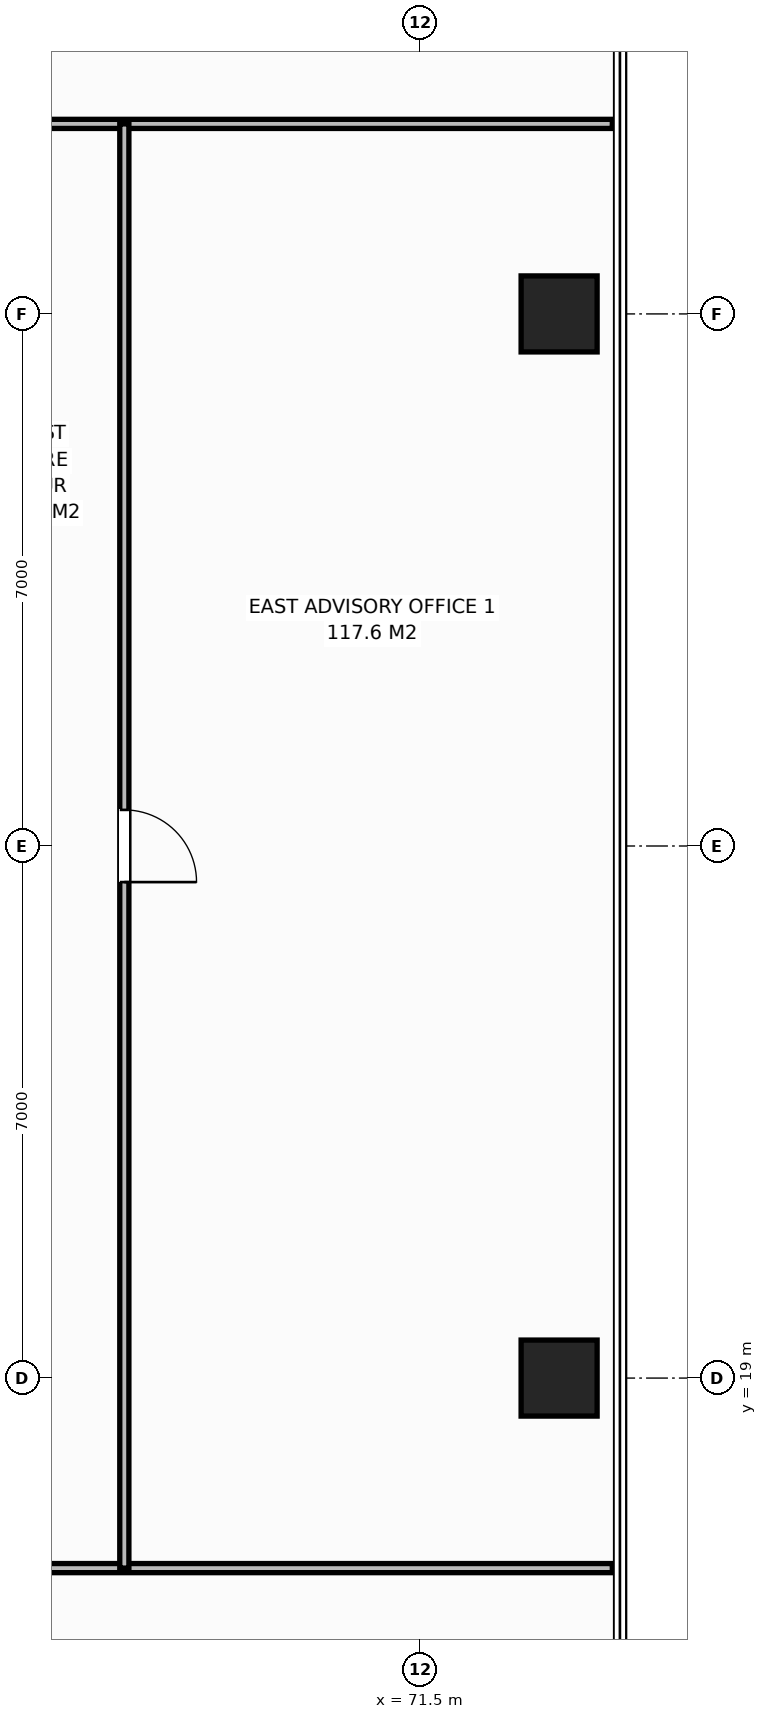
"""IFC4 building model, lengths in metres.
Left out: names, types, materials, properties, quantities, classifications, styles, units other than length and angle.
Written with IfcOpenShell. Run it as: python <this file> out.ifc"""

import sys

from ifc_helpers import new_model, si_unit, direction, frame, frame_2d, origin, origin_2d, place, context, subcontext, project, spatial, rectangle, extrude, element, fill, save


model = new_model("IFC4")
c1 = context("Model", 3, precision=1e-05, world=origin(), true_north=direction((0.0, 1.0)))
c2 = subcontext(c1, "Body", "Model", "MODEL_VIEW")
j1 = project(units=[si_unit("LENGTHUNIT", "METRE"), si_unit("PLANEANGLEUNIT", "RADIAN")], contexts=[c1])
p1 = place(None, origin())
s1 = spatial("IfcSite", under=j1, at=p1, CompositionType="ELEMENT")
p2 = place(p1, origin())
s2 = spatial("IfcBuilding", under=s1, at=p2, CompositionType="ELEMENT")
p3 = place(p2, frame((0.0, 0.0, 148.0)))
s3 = spatial("IfcBuildingStorey", under=s2, at=p3, CompositionType="ELEMENT", Elevation=148.0)
for number, where, z_axis, x_axis in (
    (1, (73.32, 19.0, 0.0), (0.0, 0.0, 1.0), (1.0, 0.0, 0.0)),
    (2, (73.32, 33.0, 0.0), (0.0, 0.0, 1.0), (1.0, 0.0, 0.0)),
):
    element("IfcColumn", number, at=place(p3, frame(where, z_axis=z_axis, x_axis=x_axis)), inside=s3, PredefinedType="COLUMN", context=c2, shape_type="SweptSolid", body=[
        extrude(rectangle(XDim=1.0, YDim=1.0, at=origin_2d()), origin(), (0.0, 0.0, 1.0), 3.8),
    ])
p4 = place(p3, frame((60.983, 35.5, 0.0), z_axis=(0.0, 0.0, 1.0), x_axis=(1.0, 0.0, 0.0)))
e3 = element("IfcWall", 3, at=p4, inside=s3, PredefinedType="PARTITIONING", context=c2, shape_type="SweptSolid", body=[
    extrude(rectangle(XDim=13.037, YDim=0.12, at=frame_2d((6.519, 0.0))), origin(), (0.0, 0.0, 1.0), 3.572),
])
p5 = place(p4, frame((0.48, 0.0, 0.0)))
e4 = element("IfcOpeningElement", 4, at=p5, cuts=e3, PredefinedType="OPENING", context=c2, shape_type="SweptSolid", body=[
    extrude(rectangle(XDim=0.95, YDim=2.15, at=frame_2d((0.475, 1.075))), frame((0.0, 0.07, 0.0), z_axis=(0.0, -1.0, 0.0), x_axis=(1.0, 0.0, 0.0)), (0.0, 0.0, 1.0), 0.14),
])
p6 = place(p3, frame((56.094, 16.5, 0.0), z_axis=(0.0, 0.0, 1.0), x_axis=(1.0, 0.0, 0.0)))
e5 = element("IfcWall", 5, at=p6, inside=s3, PredefinedType="PARTITIONING", context=c2, shape_type="SweptSolid", body=[
    extrude(rectangle(XDim=17.926, YDim=0.12, at=frame_2d((8.963, 0.0))), origin(), (0.0, 0.0, 1.0), 3.572),
])
p7 = place(p6, frame((5.278, 0.0, 0.0)))
e6 = element("IfcOpeningElement", 6, at=p7, cuts=e5, PredefinedType="OPENING", context=c2, shape_type="SweptSolid", body=[
    extrude(rectangle(XDim=0.95, YDim=2.15, at=frame_2d((0.475, 1.075))), frame((0.0, 0.07, 0.0), z_axis=(0.0, -1.0, 0.0), x_axis=(1.0, 0.0, 0.0)), (0.0, 0.0, 1.0), 0.14),
])
p8 = place(p3, frame((67.6, 16.5, 0.0), z_axis=(0.0, 0.0, 1.0), x_axis=(0.0, 1.0, 0.0)))
e7 = element("IfcWall", 7, at=p8, inside=s3, PredefinedType="PARTITIONING", context=c2, shape_type="SweptSolid", body=[
    extrude(rectangle(XDim=19.0, YDim=0.12, at=frame_2d((9.5, 0.0))), origin(), (0.0, 0.0, 1.0), 3.572),
])
p9 = place(p8, frame((9.025, 0.0, 0.0)))
e8 = element("IfcOpeningElement", 8, at=p9, cuts=e7, PredefinedType="OPENING", context=c2, shape_type="SweptSolid", body=[
    extrude(rectangle(XDim=0.95, YDim=2.15, at=frame_2d((0.475, 1.075))), frame((0.0, 0.07, 0.0), z_axis=(0.0, -1.0, 0.0), x_axis=(1.0, 0.0, 0.0)), (0.0, 0.0, 1.0), 0.14),
])
p10 = place(p9, origin())
e9 = element("IfcDoor", 9, at=p10, inside=s3, OperationType="SINGLE_SWING_RIGHT", PredefinedType="DOOR", context=c2, shape_type="SweptSolid", body=[
    extrude(rectangle(XDim=0.95, YDim=2.15, at=frame_2d((0.475, 1.075))), frame((0.0, 0.025, 0.0), z_axis=(0.0, -1.0, 0.0), x_axis=(1.0, 0.0, 0.0)), (0.0, 0.0, 1.0), 0.05),
])
fill(e8, e9)
save(model, sys.argv[1])
